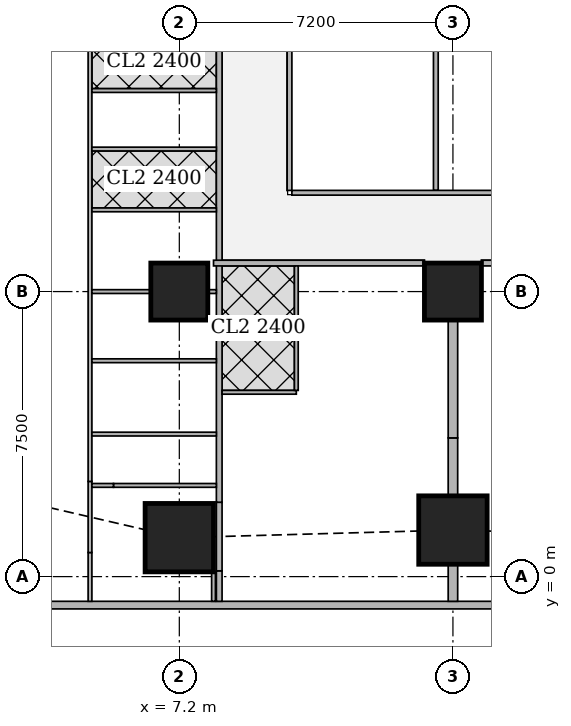
"""IFC4 building model, lengths in metres.
Left out: names, types, materials, properties, quantities, classifications, styles, units other than length and angle.
Written with IfcOpenShell. Run it as: python <this file> out.ifc"""

import sys

from ifc_helpers import new_model, si_unit, direction, frame, frame_2d, origin, origin_2d, place, context, subcontext, project, spatial, rectangle, extrude, element, fill, save


model = new_model("IFC4")
c1 = context("Model", 3, precision=1e-05, world=origin(), true_north=direction((0.0, 1.0)))
c2 = subcontext(c1, "Body", "Model", "MODEL_VIEW")
j1 = project(units=[si_unit("LENGTHUNIT", "METRE"), si_unit("PLANEANGLEUNIT", "RADIAN")], contexts=[c1])
p1 = place(None, origin())
s1 = spatial("IfcSite", under=j1, at=p1, CompositionType="ELEMENT")
p2 = place(p1, origin())
s2 = spatial("IfcBuilding", under=s1, at=p2, CompositionType="ELEMENT")
p3 = place(p2, frame((0.0, 0.0, 147.05)))
s3 = spatial("IfcBuildingStorey", under=s2, at=p3, CompositionType="ELEMENT", Elevation=147.05)
for number, where, z_axis, x_axis in (
    (1, (7.2, 1.025, 0.0), (0.0, 0.0, 1.0), (1.0, 0.0, 0.0)),
    (2, (14.4, 1.225, 0.0), (0.0, 0.0, 1.0), (1.0, 0.0, 0.0)),
):
    element("IfcColumn", number, at=place(p3, frame(where, z_axis=z_axis, x_axis=x_axis)), inside=s3, PredefinedType="COLUMN", context=c2, shape_type="SweptSolid", body=[
        extrude(rectangle(XDim=1.8, YDim=1.8, at=origin_2d()), origin(), (0.0, 0.0, 1.0), 3.75),
    ])
for number, where, z_axis, x_axis in (
    (3, (7.2, 7.5, 0.0), (0.0, 0.0, 1.0), (1.0, 0.0, 0.0)),
    (4, (14.4, 7.5, 0.0), (0.0, 0.0, 1.0), (1.0, 0.0, 0.0)),
):
    element("IfcColumn", number, at=place(p3, frame(where, z_axis=z_axis, x_axis=x_axis)), inside=s3, PredefinedType="COLUMN", context=c2, shape_type="SweptSolid", body=[
        extrude(rectangle(XDim=1.5, YDim=1.5, at=origin_2d()), origin(), (0.0, 0.0, 1.0), 3.75),
    ])
p4 = place(p3, frame((2.163, -0.75, 0.0), z_axis=(0.0, 0.0, 1.0), x_axis=(1.0, 0.0, 0.0)))
e5 = element("IfcWall", 5, at=p4, inside=s3, PredefinedType="SOLIDWALL", context=c2, shape_type="SweptSolid", body=[
    extrude(rectangle(XDim=45.628, YDim=0.2, at=frame_2d((22.814, 0.0))), origin(), (0.0, 0.0, 1.0), 3.5),
])
p5 = place(p4, frame((9.537, 0.0, 0.9)))
e6 = element("IfcOpeningElement", 6, at=p5, cuts=e5, PredefinedType="OPENING", context=c2, shape_type="SweptSolid", body=[
    extrude(rectangle(XDim=1.8, YDim=1.5, at=frame_2d((0.9, 0.75))), frame((0.0, 0.11, 0.0), z_axis=(0.0, -1.0, 0.0), x_axis=(1.0, 0.0, 0.0)), (0.0, 0.0, 1.0), 0.22),
])
p6 = place(p4, frame((13.137, 0.0, 0.9)))
e7 = element("IfcOpeningElement", 7, at=p6, cuts=e5, PredefinedType="OPENING", context=c2, shape_type="SweptSolid", body=[
    extrude(rectangle(XDim=1.8, YDim=1.5, at=frame_2d((0.9, 0.75))), frame((0.0, 0.11, 0.0), z_axis=(0.0, -1.0, 0.0), x_axis=(1.0, 0.0, 0.0)), (0.0, 0.0, 1.0), 0.22),
])
p7 = place(p4, frame((16.737, 0.0, 0.9)))
e8 = element("IfcOpeningElement", 8, at=p7, cuts=e5, PredefinedType="OPENING", context=c2, shape_type="SweptSolid", body=[
    extrude(rectangle(XDim=1.8, YDim=1.5, at=frame_2d((0.9, 0.75))), frame((0.0, 0.11, 0.0), z_axis=(0.0, -1.0, 0.0), x_axis=(1.0, 0.0, 0.0)), (0.0, 0.0, 1.0), 0.22),
])
p8 = place(p4, frame((20.337, 0.0, 0.9)))
e9 = element("IfcOpeningElement", 9, at=p8, cuts=e5, PredefinedType="OPENING", context=c2, shape_type="SweptSolid", body=[
    extrude(rectangle(XDim=1.8, YDim=1.5, at=frame_2d((0.9, 0.75))), frame((0.0, 0.11, 0.0), z_axis=(0.0, -1.0, 0.0), x_axis=(1.0, 0.0, 0.0)), (0.0, 0.0, 1.0), 0.22),
])
p9 = place(p4, frame((23.937, 0.0, 0.9)))
e10 = element("IfcOpeningElement", 10, at=p9, cuts=e5, PredefinedType="OPENING", context=c2, shape_type="SweptSolid", body=[
    extrude(rectangle(XDim=1.8, YDim=1.5, at=frame_2d((0.9, 0.75))), frame((0.0, 0.11, 0.0), z_axis=(0.0, -1.0, 0.0), x_axis=(1.0, 0.0, 0.0)), (0.0, 0.0, 1.0), 0.22),
])
p10 = place(p4, frame((27.537, 0.0, 0.9)))
e11 = element("IfcOpeningElement", 11, at=p10, cuts=e5, PredefinedType="OPENING", context=c2, shape_type="SweptSolid", body=[
    extrude(rectangle(XDim=1.8, YDim=1.5, at=frame_2d((0.9, 0.75))), frame((0.0, 0.11, 0.0), z_axis=(0.0, -1.0, 0.0), x_axis=(1.0, 0.0, 0.0)), (0.0, 0.0, 1.0), 0.22),
])
p11 = place(p4, frame((31.137, 0.0, 0.9)))
e12 = element("IfcOpeningElement", 12, at=p11, cuts=e5, PredefinedType="OPENING", context=c2, shape_type="SweptSolid", body=[
    extrude(rectangle(XDim=1.8, YDim=1.5, at=frame_2d((0.9, 0.75))), frame((0.0, 0.11, 0.0), z_axis=(0.0, -1.0, 0.0), x_axis=(1.0, 0.0, 0.0)), (0.0, 0.0, 1.0), 0.22),
])
p12 = place(p4, frame((34.737, 0.0, 0.9)))
e13 = element("IfcOpeningElement", 13, at=p12, cuts=e5, PredefinedType="OPENING", context=c2, shape_type="SweptSolid", body=[
    extrude(rectangle(XDim=1.8, YDim=1.5, at=frame_2d((0.9, 0.75))), frame((0.0, 0.11, 0.0), z_axis=(0.0, -1.0, 0.0), x_axis=(1.0, 0.0, 0.0)), (0.0, 0.0, 1.0), 0.22),
])
p13 = place(p3, frame((8.25, -0.65, 0.0), z_axis=(0.0, 0.0, 1.0), x_axis=(0.0, 1.0, 0.0)))
e14 = element("IfcWall", 14, at=p13, inside=s3, PredefinedType="SOLIDWALL", context=c2, shape_type="SweptSolid", body=[
    extrude(rectangle(XDim=0.802, YDim=0.15, at=frame_2d((0.401, 0.0))), origin(), (0.0, 0.0, 1.0), 3.5),
])
p14 = place(p3, frame((8.25, 0.152, 0.0), z_axis=(0.0, 0.0, 1.0), x_axis=(0.0, 1.0, 0.0)))
e15 = element("IfcWall", 15, at=p14, inside=s3, PredefinedType="SOLIDWALL", context=c2, shape_type="SweptSolid", body=[
    extrude(rectangle(XDim=1.805, YDim=0.15, at=frame_2d((0.902, 0.0))), origin(), (0.0, 0.0, 1.0), 2.1),
])
p15 = place(p3, frame((8.25, 1.957, 0.0), z_axis=(0.0, 0.0, 1.0), x_axis=(0.0, 1.0, 0.0)))
e16 = element("IfcWall", 16, at=p15, inside=s3, PredefinedType="SOLIDWALL", context=c2, shape_type="SweptSolid", body=[
    extrude(rectangle(XDim=41.111, YDim=0.15, at=frame_2d((20.556, 0.0))), origin(), (0.0, 0.0, 1.0), 3.5),
])
p16 = place(p15, frame((14.418, 0.0, 0.0)))
e17 = element("IfcOpeningElement", 17, at=p16, cuts=e16, PredefinedType="OPENING", context=c2, shape_type="SweptSolid", body=[
    extrude(rectangle(XDim=1.0, YDim=2.1, at=frame_2d((0.5, 1.05))), frame((0.0, 0.085, 0.0), z_axis=(0.0, -1.0, 0.0), x_axis=(1.0, 0.0, 0.0)), (0.0, 0.0, 1.0), 0.17),
])
p17 = place(p15, frame((18.168, 0.0, 0.0)))
e18 = element("IfcOpeningElement", 18, at=p17, cuts=e16, PredefinedType="OPENING", context=c2, shape_type="SweptSolid", body=[
    extrude(rectangle(XDim=1.0, YDim=2.1, at=frame_2d((0.5, 1.05))), frame((0.0, 0.085, 0.0), z_axis=(0.0, -1.0, 0.0), x_axis=(1.0, 0.0, 0.0)), (0.0, 0.0, 1.0), 0.17),
])
p18 = place(p15, frame((33.168, 0.0, 0.0)))
e19 = element("IfcOpeningElement", 19, at=p18, cuts=e16, PredefinedType="OPENING", context=c2, shape_type="SweptSolid", body=[
    extrude(rectangle(XDim=1.0, YDim=2.1, at=frame_2d((0.5, 1.05))), frame((0.0, 0.085, 0.0), z_axis=(0.0, -1.0, 0.0), x_axis=(1.0, 0.0, 0.0)), (0.0, 0.0, 1.0), 0.17),
])
p19 = place(p3, frame((20.849, 8.25, 0.0), z_axis=(0.0, 0.0, 1.0), x_axis=(-1.0, 0.0, 0.0)))
e20 = element("IfcWall", 20, at=p19, inside=s3, PredefinedType="SOLIDWALL", context=c2, shape_type="SweptSolid", body=[
    extrude(rectangle(XDim=5.698, YDim=0.15, at=frame_2d((2.849, 0.0))), origin(), (0.0, 0.0, 1.0), 3.5),
])
p20 = place(p19, frame((3.949, 0.0, 0.0)))
e21 = element("IfcOpeningElement", 21, at=p20, cuts=e20, PredefinedType="OPENING", context=c2, shape_type="SweptSolid", body=[
    extrude(rectangle(XDim=1.0, YDim=2.1, at=frame_2d((0.5, 1.05))), frame((0.0, 0.085, 0.0), z_axis=(0.0, -1.0, 0.0), x_axis=(1.0, 0.0, 0.0)), (0.0, 0.0, 1.0), 0.17),
])
p21 = place(p3, frame((13.649, 8.25, 0.0), z_axis=(0.0, 0.0, 1.0), x_axis=(-1.0, 0.0, 0.0)))
e22 = element("IfcWall", 22, at=p21, inside=s3, PredefinedType="SOLIDWALL", context=c2, shape_type="SweptSolid", body=[
    extrude(rectangle(XDim=5.549, YDim=0.15, at=frame_2d((2.774, 0.0))), origin(), (0.0, 0.0, 1.0), 3.5),
])
p22 = place(p21, frame((0.81, 0.0, 0.0)))
e23 = element("IfcOpeningElement", 23, at=p22, cuts=e22, PredefinedType="OPENING", context=c2, shape_type="SweptSolid", body=[
    extrude(rectangle(XDim=1.0, YDim=2.1, at=frame_2d((0.5, 1.05))), frame((0.0, 0.085, 0.0), z_axis=(0.0, -1.0, 0.0), x_axis=(1.0, 0.0, 0.0)), (0.0, 0.0, 1.0), 0.17),
])
p23 = place(p3, frame((8.1, 0.124, 0.0), z_axis=(0.0, 0.0, 1.0), x_axis=(0.0, -1.0, 0.0)))
e24 = element("IfcWall", 24, at=p23, inside=s3, PredefinedType="PARTITIONING", context=c2, shape_type="SweptSolid", body=[
    extrude(rectangle(XDim=0.774, YDim=0.1, at=frame_2d((0.387, 0.0))), origin(), (0.0, 0.0, 1.0), 3.5),
])
p24 = place(p3, frame((4.85, -0.65, 0.0), z_axis=(0.0, 0.0, 1.0), x_axis=(0.0, 1.0, 0.0)))
e25 = element("IfcWall", 25, at=p24, inside=s3, PredefinedType="PARTITIONING", context=c2, shape_type="SweptSolid", body=[
    extrude(rectangle(XDim=1.284, YDim=0.1, at=frame_2d((0.642, 0.0))), origin(), (0.0, 0.0, 1.0), 3.5),
])
p25 = place(p24, frame((0.234, 0.0, 0.0)))
e26 = element("IfcOpeningElement", 26, at=p25, cuts=e25, PredefinedType="OPENING", context=c2, shape_type="SweptSolid", body=[
    extrude(rectangle(XDim=0.9, YDim=2.1, at=frame_2d((0.45, 1.05))), frame((0.0, 0.06, 0.0), z_axis=(0.0, -1.0, 0.0), x_axis=(1.0, 0.0, 0.0)), (0.0, 0.0, 1.0), 0.12),
])
p26 = place(p3, frame((4.85, 0.634, 0.0), z_axis=(0.0, 0.0, 1.0), x_axis=(0.0, 1.0, 0.0)))
e27 = element("IfcWall", 27, at=p26, inside=s3, PredefinedType="PARTITIONING", context=c2, shape_type="SweptSolid", body=[
    extrude(rectangle(XDim=1.871, YDim=0.1, at=frame_2d((0.936, 0.0))), origin(), (0.0, 0.0, 1.0), 2.1),
])
p27 = place(p3, frame((4.85, 2.505, 0.0), z_axis=(0.0, 0.0, 1.0), x_axis=(0.0, 1.0, 0.0)))
e28 = element("IfcWall", 28, at=p27, inside=s3, PredefinedType="PARTITIONING", context=c2, shape_type="SweptSolid", body=[
    extrude(rectangle(XDim=12.495, YDim=0.1, at=frame_2d((6.248, 0.0))), origin(), (0.0, 0.0, 1.0), 3.5),
])
p28 = place(p27, frame((10.94, 0.0, 0.0)))
e29 = element("IfcOpeningElement", 29, at=p28, cuts=e28, PredefinedType="OPENING", context=c2, shape_type="SweptSolid", body=[
    extrude(rectangle(XDim=0.9, YDim=2.1, at=frame_2d((0.45, 1.05))), frame((0.0, 0.06, 0.0), z_axis=(0.0, -1.0, 0.0), x_axis=(1.0, 0.0, 0.0)), (0.0, 0.0, 1.0), 0.12),
])
p29 = place(p27, frame((7.495, 0.0, 0.0)))
e30 = element("IfcOpeningElement", 30, at=p29, cuts=e28, PredefinedType="OPENING", context=c2, shape_type="SweptSolid", body=[
    extrude(rectangle(XDim=0.9, YDim=2.1, at=frame_2d((0.45, 1.05))), frame((0.0, 0.06, 0.0), z_axis=(0.0, -1.0, 0.0), x_axis=(1.0, 0.0, 0.0)), (0.0, 0.0, 1.0), 0.12),
])
p30 = place(p27, frame((3.635, 0.0, 0.0)))
e31 = element("IfcOpeningElement", 31, at=p30, cuts=e28, PredefinedType="OPENING", context=c2, shape_type="SweptSolid", body=[
    extrude(rectangle(XDim=0.9, YDim=2.1, at=frame_2d((0.45, 1.05))), frame((0.0, 0.06, 0.0), z_axis=(0.0, -1.0, 0.0), x_axis=(1.0, 0.0, 0.0)), (0.0, 0.0, 1.0), 0.12),
])
p31 = place(p27, frame((9.065, 0.0, 0.0)))
e32 = element("IfcOpeningElement", 32, at=p31, cuts=e28, PredefinedType="OPENING", context=c2, shape_type="SweptSolid", body=[
    extrude(rectangle(XDim=0.9, YDim=2.1, at=frame_2d((0.45, 1.05))), frame((0.0, 0.06, 0.0), z_axis=(0.0, -1.0, 0.0), x_axis=(1.0, 0.0, 0.0)), (0.0, 0.0, 1.0), 0.12),
])
p32 = place(p27, frame((5.62, 0.0, 0.0)))
e33 = element("IfcOpeningElement", 33, at=p32, cuts=e28, PredefinedType="OPENING", context=c2, shape_type="SweptSolid", body=[
    extrude(rectangle(XDim=0.9, YDim=2.1, at=frame_2d((0.45, 1.05))), frame((0.0, 0.06, 0.0), z_axis=(0.0, -1.0, 0.0), x_axis=(1.0, 0.0, 0.0)), (0.0, 0.0, 1.0), 0.12),
])
p33 = place(p27, frame((1.76, 0.0, 0.0)))
e34 = element("IfcOpeningElement", 34, at=p33, cuts=e28, PredefinedType="OPENING", context=c2, shape_type="SweptSolid", body=[
    extrude(rectangle(XDim=0.9, YDim=2.1, at=frame_2d((0.45, 1.05))), frame((0.0, 0.06, 0.0), z_axis=(0.0, -1.0, 0.0), x_axis=(1.0, 0.0, 0.0)), (0.0, 0.0, 1.0), 0.12),
])
p34 = place(p3, frame((4.9, 3.75, 0.0), z_axis=(0.0, 0.0, 1.0), x_axis=(1.0, 0.0, 0.0)))
e35 = element("IfcWall", 35, at=p34, inside=s3, PredefinedType="PARTITIONING", context=c2, shape_type="SweptSolid", body=[
    extrude(rectangle(XDim=3.275, YDim=0.1, at=frame_2d((1.638, 0.0))), origin(), (0.0, 0.0, 1.0), 3.5),
])
p35 = place(p3, frame((4.9, 7.5, 0.0), z_axis=(0.0, 0.0, 1.0), x_axis=(1.0, 0.0, 0.0)))
e36 = element("IfcWall", 36, at=p35, inside=s3, PredefinedType="PARTITIONING", context=c2, shape_type="SweptSolid", body=[
    extrude(rectangle(XDim=1.549, YDim=0.1, at=frame_2d((0.774, 0.0))), origin(), (0.0, 0.0, 1.0), 3.5),
])
p36 = place(p3, frame((7.951, 7.5, 0.0), z_axis=(0.0, 0.0, 1.0), x_axis=(1.0, 0.0, 0.0)))
e37 = element("IfcWall", 37, at=p36, inside=s3, PredefinedType="PARTITIONING", context=c2, shape_type="SweptSolid", body=[
    extrude(rectangle(XDim=0.224, YDim=0.1, at=frame_2d((0.112, 0.0))), origin(), (0.0, 0.0, 1.0), 3.5),
])
for number, where, z_axis, x_axis in (
    (38, (4.9, 11.25, 0.0), (0.0, 0.0, 1.0), (1.0, 0.0, 0.0)),
    (39, (4.9, 12.79, 0.0), (0.0, 0.0, 1.0), (1.0, 0.0, 0.0)),
    (40, (4.9, 9.65, 0.0), (0.0, 0.0, 1.0), (1.0, 0.0, 0.0)),
    (41, (4.9, 5.68, 0.0), (0.0, 0.0, 1.0), (1.0, 0.0, 0.0)),
):
    element("IfcWall", number, at=place(p3, frame(where, z_axis=z_axis, x_axis=x_axis)), inside=s3, PredefinedType="PARTITIONING", context=c2, shape_type="SweptSolid", body=[
        extrude(rectangle(XDim=3.275, YDim=0.1, at=frame_2d((1.638, 0.0))), origin(), (0.0, 0.0, 1.0), 3.5),
    ])
p37 = place(p3, frame((10.279, 4.85, 0.0), z_axis=(0.0, 0.0, 1.0), x_axis=(-1.0, 0.0, 0.0)))
e42 = element("IfcWall", 42, at=p37, inside=s3, PredefinedType="PARTITIONING", context=c2, shape_type="SweptSolid", body=[
    extrude(rectangle(XDim=1.954, YDim=0.1, at=frame_2d((0.977, 0.0))), origin(), (0.0, 0.0, 1.0), 3.5),
])
p38 = place(p37, frame((0.579, 0.0, 0.0)))
e43 = element("IfcOpeningElement", 43, at=p38, cuts=e42, PredefinedType="OPENING", context=c2, shape_type="SweptSolid", body=[
    extrude(rectangle(XDim=0.9, YDim=2.1, at=frame_2d((0.45, 1.05))), frame((0.0, 0.06, 0.0), z_axis=(0.0, -1.0, 0.0), x_axis=(1.0, 0.0, 0.0)), (0.0, 0.0, 1.0), 0.12),
])
p39 = place(p3, frame((10.279, 4.9, 0.0), z_axis=(0.0, 0.0, 1.0), x_axis=(0.0, 1.0, 0.0)))
e44 = element("IfcWall", 44, at=p39, inside=s3, PredefinedType="PARTITIONING", context=c2, shape_type="SweptSolid", body=[
    extrude(rectangle(XDim=3.275, YDim=0.1, at=frame_2d((1.638, 0.0))), origin(), (0.0, 0.0, 1.0), 3.5),
])
p40 = place(p3, frame((14.4, -0.65, 0.0), z_axis=(0.0, 0.0, 1.0), x_axis=(0.0, 1.0, 0.0)))
e45 = element("IfcWall", 45, at=p40, inside=s3, PredefinedType="SOLIDWALL", context=c2, shape_type="SweptSolid", body=[
    extrude(rectangle(XDim=0.974, YDim=0.25, at=frame_2d((0.487, 0.0))), origin(), (0.0, 0.0, 1.0), 2.1),
])
p41 = place(p3, frame((14.4, 2.126, 0.0), z_axis=(0.0, 0.0, 1.0), x_axis=(0.0, 1.0, 0.0)))
e46 = element("IfcWall", 46, at=p41, inside=s3, PredefinedType="SOLIDWALL", context=c2, shape_type="SweptSolid", body=[
    extrude(rectangle(XDim=1.524, YDim=0.25, at=frame_2d((0.762, 0.0))), origin(), (0.0, 0.0, 1.0), 2.1),
])
p42 = place(p3, frame((14.4, 3.65, 0.0), z_axis=(0.0, 0.0, 1.0), x_axis=(0.0, 1.0, 0.0)))
e47 = element("IfcWall", 47, at=p42, inside=s3, PredefinedType="SOLIDWALL", context=c2, shape_type="SweptSolid", body=[
    extrude(rectangle(XDim=3.099, YDim=0.25, at=frame_2d((1.55, 0.0))), origin(), (0.0, 0.0, 1.0), 3.5),
])
p43 = place(p3, frame((5.467, 2.4, 0.0), z_axis=(0.0, 0.0, 1.0), x_axis=(1.0, 0.0, 0.0)))
e48 = element("IfcWall", 48, at=p43, inside=s3, PredefinedType="PARTITIONING", context=c2, shape_type="SweptSolid", body=[
    extrude(rectangle(XDim=2.708, YDim=0.1, at=frame_2d((1.354, 0.0))), origin(), (0.0, 0.0, 1.0), 3.5),
])
p44 = place(p43, frame((0.108, 0.0, 0.0)))
e49 = element("IfcOpeningElement", 49, at=p44, cuts=e48, PredefinedType="OPENING", context=c2, shape_type="SweptSolid", body=[
    extrude(rectangle(XDim=0.9, YDim=2.1, at=frame_2d((0.45, 1.05))), frame((0.0, 0.06, 0.0), z_axis=(0.0, -1.0, 0.0), x_axis=(1.0, 0.0, 0.0)), (0.0, 0.0, 1.0), 0.12),
])
p45 = place(p3, frame((5.467, 2.4, 0.0), z_axis=(0.0, 0.0, 1.0), x_axis=(-1.0, 0.0, 0.0)))
e50 = element("IfcWall", 50, at=p45, inside=s3, PredefinedType="PARTITIONING", context=c2, shape_type="SweptSolid", body=[
    extrude(rectangle(XDim=0.567, YDim=0.1, at=frame_2d((0.284, 0.0))), origin(), (0.0, 0.0, 1.0), 2.1),
])
p46 = place(p3, frame((10.1, 10.162, 0.0), z_axis=(0.0, 0.0, 1.0), x_axis=(0.0, 1.0, 0.0)))
e51 = element("IfcWall", 51, at=p46, inside=s3, PredefinedType="PARTITIONING", context=c2, shape_type="SweptSolid", body=[
    extrude(rectangle(XDim=4.288, YDim=0.125, at=frame_2d((2.144, 0.0))), origin(), (0.0, 0.0, 1.0), 3.5),
])
p47 = place(p46, frame((1.563, 0.0, 0.0)))
e52 = element("IfcOpeningElement", 52, at=p47, cuts=e51, PredefinedType="OPENING", context=c2, shape_type="SweptSolid", body=[
    extrude(rectangle(XDim=1.0, YDim=2.1, at=frame_2d((0.5, 1.05))), frame((0.0, 0.073, 0.0), z_axis=(0.0, -1.0, 0.0), x_axis=(1.0, 0.0, 0.0)), (0.0, 0.0, 1.0), 0.145),
])
p48 = place(p3, frame((13.95, 10.163, 0.0), z_axis=(0.0, 0.0, 1.0), x_axis=(0.0, 1.0, 0.0)))
e53 = element("IfcWall", 53, at=p48, inside=s3, PredefinedType="PARTITIONING", context=c2, shape_type="SweptSolid", body=[
    extrude(rectangle(XDim=4.175, YDim=0.125, at=frame_2d((2.087, 0.0))), origin(), (0.0, 0.0, 1.0), 3.5),
])
p49 = place(p3, frame((10.162, 10.1, 0.0), z_axis=(0.0, 0.0, 1.0), x_axis=(1.0, 0.0, 0.0)))
e54 = element("IfcWall", 54, at=p49, inside=s3, PredefinedType="PARTITIONING", context=c2, shape_type="SweptSolid", body=[
    extrude(rectangle(XDim=11.288, YDim=0.125, at=frame_2d((5.644, 0.0))), origin(), (0.0, 0.0, 1.0), 3.5),
])
p50 = place(p49, frame((7.833, 0.0, 0.0)))
e55 = element("IfcOpeningElement", 55, at=p50, cuts=e54, PredefinedType="OPENING", context=c2, shape_type="SweptSolid", body=[
    extrude(rectangle(XDim=1.8, YDim=2.1, at=frame_2d((0.9, 1.05))), frame((0.0, 0.073, 0.0), z_axis=(0.0, -1.0, 0.0), x_axis=(1.0, 0.0, 0.0)), (0.0, 0.0, 1.0), 0.145),
])
p51 = place(p5, origin())
e56 = element("IfcWindow", 56, at=p51, inside=s3, PartitioningType="SINGLE_PANEL", PredefinedType="WINDOW", context=c2, shape_type="SweptSolid", body=[
    extrude(rectangle(XDim=1.8, YDim=1.5, at=frame_2d((0.9, 0.75))), frame((0.0, 0.03, 0.0), z_axis=(0.0, -1.0, 0.0), x_axis=(1.0, 0.0, 0.0)), (0.0, 0.0, 1.0), 0.06),
])
fill(e6, e56)
p52 = place(p6, origin())
e57 = element("IfcWindow", 57, at=p52, inside=s3, PartitioningType="SINGLE_PANEL", PredefinedType="WINDOW", context=c2, shape_type="SweptSolid", body=[
    extrude(rectangle(XDim=1.8, YDim=1.5, at=frame_2d((0.9, 0.75))), frame((0.0, 0.03, 0.0), z_axis=(0.0, -1.0, 0.0), x_axis=(1.0, 0.0, 0.0)), (0.0, 0.0, 1.0), 0.06),
])
fill(e7, e57)
p53 = place(p28, origin())
e58 = element("IfcDoor", 58, at=p53, inside=s3, OperationType="SINGLE_SWING_LEFT", PredefinedType="DOOR", context=c2, shape_type="SweptSolid", body=[
    extrude(rectangle(XDim=0.9, YDim=2.1, at=frame_2d((0.45, 1.05))), frame((0.0, 0.025, 0.0), z_axis=(0.0, -1.0, 0.0), x_axis=(1.0, 0.0, 0.0)), (0.0, 0.0, 1.0), 0.05),
])
fill(e29, e58)
p54 = place(p29, origin())
e59 = element("IfcDoor", 59, at=p54, inside=s3, OperationType="SINGLE_SWING_RIGHT", PredefinedType="DOOR", context=c2, shape_type="SweptSolid", body=[
    extrude(rectangle(XDim=0.9, YDim=2.1, at=frame_2d((0.45, 1.05))), frame((0.0, 0.025, 0.0), z_axis=(0.0, -1.0, 0.0), x_axis=(1.0, 0.0, 0.0)), (0.0, 0.0, 1.0), 0.05),
])
fill(e30, e59)
p55 = place(p30, origin())
e60 = element("IfcDoor", 60, at=p55, inside=s3, OperationType="SINGLE_SWING_RIGHT", PredefinedType="DOOR", context=c2, shape_type="SweptSolid", body=[
    extrude(rectangle(XDim=0.9, YDim=2.1, at=frame_2d((0.45, 1.05))), frame((0.0, 0.025, 0.0), z_axis=(0.0, -1.0, 0.0), x_axis=(1.0, 0.0, 0.0)), (0.0, 0.0, 1.0), 0.05),
])
fill(e31, e60)
p56 = place(p25, origin())
e61 = element("IfcDoor", 61, at=p56, inside=s3, OperationType="SINGLE_SWING_LEFT", PredefinedType="DOOR", context=c2, shape_type="SweptSolid", body=[
    extrude(rectangle(XDim=0.9, YDim=2.1, at=frame_2d((0.45, 1.05))), frame((0.0, 0.025, 0.0), z_axis=(0.0, -1.0, 0.0), x_axis=(1.0, 0.0, 0.0)), (0.0, 0.0, 1.0), 0.05),
])
fill(e26, e61)
p57 = place(p31, origin())
e62 = element("IfcDoor", 62, at=p57, inside=s3, OperationType="SINGLE_SWING_LEFT", PredefinedType="DOOR", context=c2, shape_type="SweptSolid", body=[
    extrude(rectangle(XDim=0.9, YDim=2.1, at=frame_2d((0.45, 1.05))), frame((0.0, 0.025, 0.0), z_axis=(0.0, -1.0, 0.0), x_axis=(1.0, 0.0, 0.0)), (0.0, 0.0, 1.0), 0.05),
])
fill(e32, e62)
p58 = place(p32, origin())
e63 = element("IfcDoor", 63, at=p58, inside=s3, OperationType="SINGLE_SWING_LEFT", PredefinedType="DOOR", context=c2, shape_type="SweptSolid", body=[
    extrude(rectangle(XDim=0.9, YDim=2.1, at=frame_2d((0.45, 1.05))), frame((0.0, 0.025, 0.0), z_axis=(0.0, -1.0, 0.0), x_axis=(1.0, 0.0, 0.0)), (0.0, 0.0, 1.0), 0.05),
])
fill(e33, e63)
p59 = place(p33, origin())
e64 = element("IfcDoor", 64, at=p59, inside=s3, OperationType="SINGLE_SWING_LEFT", PredefinedType="DOOR", context=c2, shape_type="SweptSolid", body=[
    extrude(rectangle(XDim=0.9, YDim=2.1, at=frame_2d((0.45, 1.05))), frame((0.0, 0.025, 0.0), z_axis=(0.0, -1.0, 0.0), x_axis=(1.0, 0.0, 0.0)), (0.0, 0.0, 1.0), 0.05),
])
fill(e34, e64)
p60 = place(p38, origin())
e65 = element("IfcDoor", 65, at=p60, inside=s3, OperationType="SINGLE_SWING_LEFT", PredefinedType="DOOR", context=c2, shape_type="SweptSolid", body=[
    extrude(rectangle(XDim=0.9, YDim=2.1, at=frame_2d((0.45, 1.05))), frame((0.0, 0.025, 0.0), z_axis=(0.0, -1.0, 0.0), x_axis=(1.0, 0.0, 0.0)), (0.0, 0.0, 1.0), 0.05),
])
fill(e43, e65)
p61 = place(p22, origin())
e66 = element("IfcDoor", 66, at=p61, inside=s3, OperationType="SINGLE_SWING_LEFT", PredefinedType="DOOR", context=c2, shape_type="SweptSolid", body=[
    extrude(rectangle(XDim=1.0, YDim=2.1, at=frame_2d((0.5, 1.05))), frame((0.0, 0.025, 0.0), z_axis=(0.0, -1.0, 0.0), x_axis=(1.0, 0.0, 0.0)), (0.0, 0.0, 1.0), 0.05),
])
fill(e23, e66)
p62 = place(p44, origin())
e67 = element("IfcDoor", 67, at=p62, inside=s3, OperationType="SINGLE_SWING_LEFT", PredefinedType="DOOR", context=c2, shape_type="SweptSolid", body=[
    extrude(rectangle(XDim=0.9, YDim=2.1, at=frame_2d((0.45, 1.05))), frame((0.0, 0.025, 0.0), z_axis=(0.0, -1.0, 0.0), x_axis=(1.0, 0.0, 0.0)), (0.0, 0.0, 1.0), 0.05),
])
fill(e49, e67)
p63 = place(p47, origin())
e68 = element("IfcDoor", 68, at=p63, inside=s3, OperationType="SINGLE_SWING_RIGHT", PredefinedType="DOOR", context=c2, shape_type="SweptSolid", body=[
    extrude(rectangle(XDim=1.0, YDim=2.1, at=frame_2d((0.5, 1.05))), frame((0.0, 0.025, 0.0), z_axis=(0.0, -1.0, 0.0), x_axis=(1.0, 0.0, 0.0)), (0.0, 0.0, 1.0), 0.05),
])
fill(e52, e68)
save(model, sys.argv[1])
